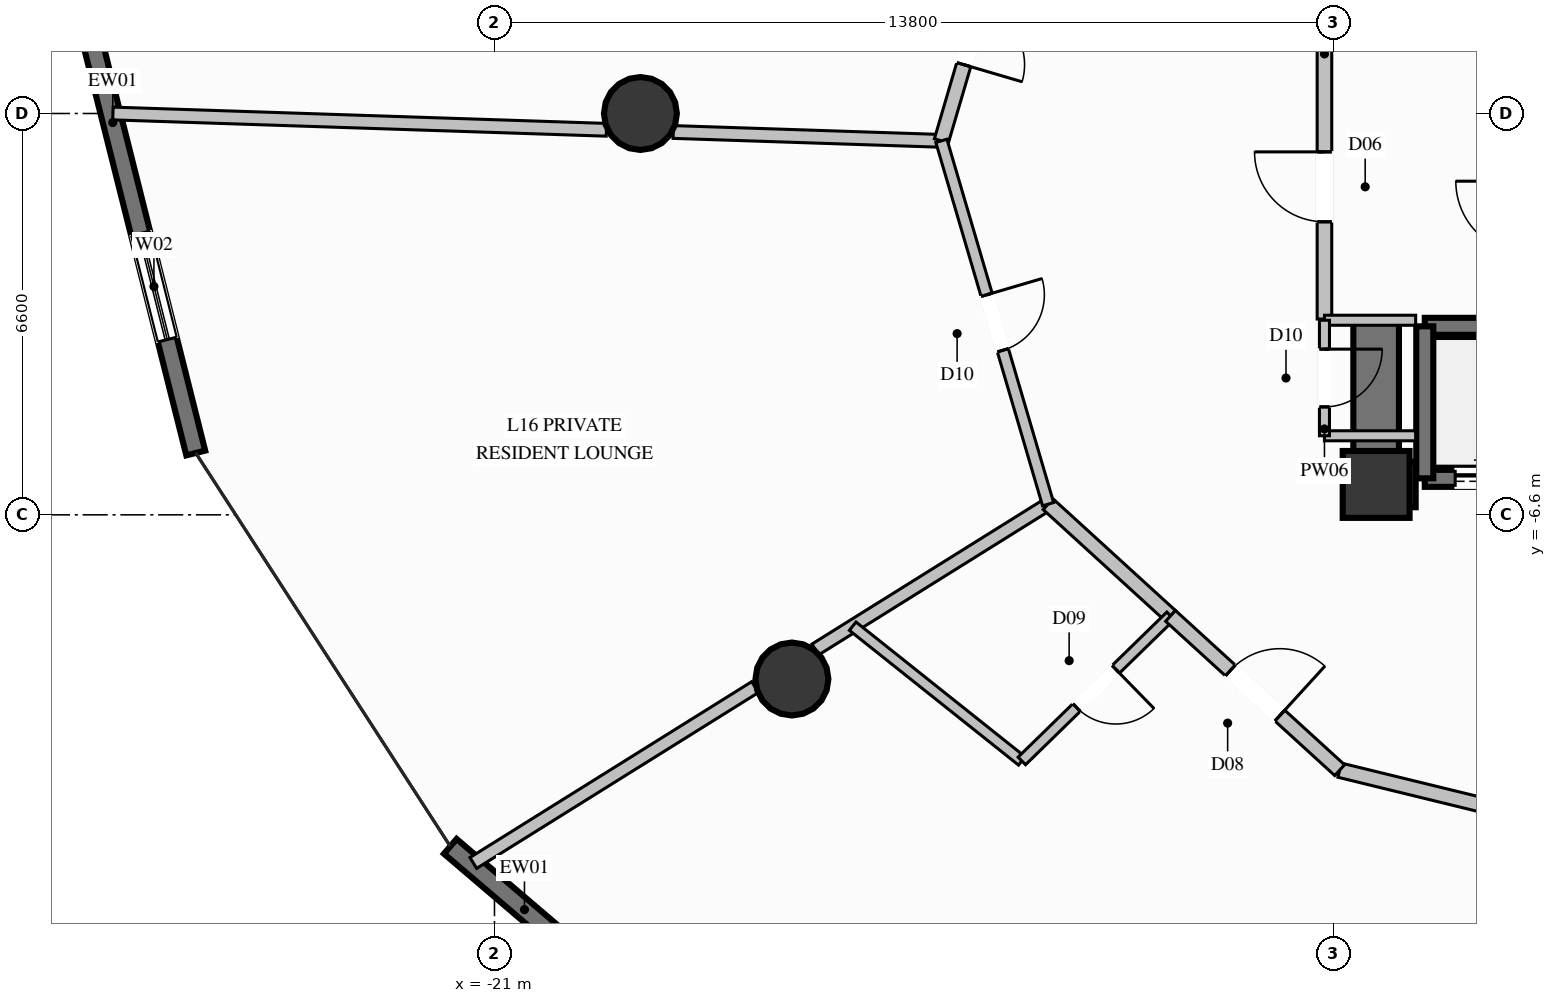
"""IFC4 building model, lengths in metres.
Left out: names, types, materials, properties, quantities, classifications, styles, units other than length and angle.
Written with IfcOpenShell. Run it as: python <this file> out.ifc"""

import sys

from ifc_helpers import new_model, si_unit, direction, frame, frame_2d, origin, origin_2d, place, context, subcontext, project, spatial, rectangle, circle, extrude, element, fill, save


model = new_model("IFC4")
c1 = context("Model", 3, precision=1e-05, world=origin(), true_north=direction((0.0, 1.0)))
c2 = subcontext(c1, "Body", "Model", "MODEL_VIEW")
j1 = project(units=[si_unit("LENGTHUNIT", "METRE"), si_unit("PLANEANGLEUNIT", "RADIAN")], contexts=[c1])
p1 = place(None, origin())
s1 = spatial("IfcSite", under=j1, at=p1, CompositionType="ELEMENT")
p2 = place(p1, origin())
s2 = spatial("IfcBuilding", under=s1, at=p2, CompositionType="ELEMENT")
p3 = place(p2, frame((0.0, 0.0, 68.0)))
s3 = spatial("IfcBuildingStorey", under=s2, at=p3, CompositionType="ELEMENT", Elevation=68.0)
p4 = place(p3, frame((-6.5, -6.1, 0.0), z_axis=(0.0, 0.0, 1.0), x_axis=(1.0, 0.0, 0.0)))
e1 = element("IfcColumn", 1, at=p4, inside=s3, PredefinedType="COLUMN", context=c2, shape_type="SweptSolid", body=[
    extrude(rectangle(XDim=1.1, YDim=1.1, at=origin_2d()), origin(), (0.0, 0.0, 1.0), 3.6),
])
p5 = place(p3, frame((-6.125, -6.1, 0.0), z_axis=(0.0, 0.0, 1.0), x_axis=(1.0, 0.0, 0.0)))
e2 = element("IfcWall", 2, at=p5, inside=s3, PredefinedType="SHEAR", context=c2, shape_type="SweptSolid", body=[
    extrude(rectangle(XDim=0.275, YDim=0.75, at=frame_2d((0.137, 0.0))), origin(), (0.0, 0.0, 1.0), 3.6),
])
p6 = place(p3, frame((-6.5, -6.475, 0.0), z_axis=(0.0, 0.0, 1.0), x_axis=(0.0, 1.0, 0.0)))
e3 = element("IfcWall", 3, at=p6, inside=s3, PredefinedType="SHEAR", context=c2, shape_type="SweptSolid", body=[
    extrude(rectangle(XDim=3.125, YDim=0.75, at=frame_2d((1.562, 0.0))), origin(), (0.0, 0.0, 1.0), 3.6),
])
for number, where, z_axis, x_axis in (
    (4, (-18.6, 0.0, 0.0), (0.0, 0.0, 1.0), (1.0, 0.0, 0.0)),
    (5, (-16.108, -9.3, 0.0), (0.0, 0.0, 1.0), (1.0, 0.0, 0.0)),
):
    element("IfcColumn", number, at=place(p3, frame(where, z_axis=z_axis, x_axis=x_axis)), inside=s3, PredefinedType="COLUMN", context=c2, shape_type="SweptSolid", body=[
        extrude(circle(Radius=0.6, at=origin_2d()), origin(), (0.0, 0.0, 1.0), 3.6),
    ])
p7 = place(p3, frame((-25.913, -5.583, 0.0), z_axis=(0.0, 0.0, 1.0), x_axis=(-0.243607685094, 0.969873855593, 0.0)))
e6 = element("IfcWall", 6, at=p7, inside=s3, PredefinedType="SOLIDWALL", context=c2, shape_type="SweptSolid", body=[
    extrude(rectangle(XDim=7.233, YDim=0.32, at=frame_2d((3.616, 0.0))), origin(), (0.0, 0.0, 1.0), 3.34),
])
p8 = place(p7, frame((1.923, 0.0, 0.35)))
e7 = element("IfcOpeningElement", 7, at=p8, cuts=e6, PredefinedType="OPENING", context=c2, shape_type="SweptSolid", body=[
    extrude(rectangle(XDim=1.8, YDim=2.6, at=frame_2d((0.9, 1.3))), frame((0.0, 0.17, 0.0), z_axis=(0.0, -1.0, 0.0), x_axis=(1.0, 0.0, 0.0)), (0.0, 0.0, 1.0), 0.34),
])
p9 = place(p3, frame((-15.527, -17.341, 0.0), z_axis=(0.0, 0.0, 1.0), x_axis=(-0.76078130933, 0.649008319958, 0.0)))
e8 = element("IfcWall", 8, at=p9, inside=s3, PredefinedType="SOLIDWALL", context=c2, shape_type="SweptSolid", body=[
    extrude(rectangle(XDim=8.149, YDim=0.32, at=frame_2d((4.075, 0.0))), origin(), (0.0, 0.0, 1.0), 3.34),
])
p10 = place(p9, frame((2.892, 0.0, 0.35)))
e9 = element("IfcOpeningElement", 9, at=p10, cuts=e8, PredefinedType="OPENING", context=c2, shape_type="SweptSolid", body=[
    extrude(rectangle(XDim=1.8, YDim=2.6, at=frame_2d((0.9, 1.3))), frame((0.0, 0.17, 0.0), z_axis=(0.0, -1.0, 0.0), x_axis=(1.0, 0.0, 0.0)), (0.0, 0.0, 1.0), 0.34),
])
p11 = place(p3, frame((-5.7, -6.0, 0.0), z_axis=(0.0, 0.0, 1.0), x_axis=(1.0, 0.0, 0.0)))
e10 = element("IfcWall", 10, at=p11, inside=s3, PredefinedType="SOLIDWALL", context=c2, shape_type="SweptSolid", body=[
    extrude(rectangle(XDim=2.1, YDim=0.28, at=frame_2d((1.05, 0.0))), origin(), (0.0, 0.0, 1.0), 3.34),
])
p12 = place(p11, frame((0.5, 0.0, 0.0)))
e11 = element("IfcOpeningElement", 11, at=p12, cuts=e10, PredefinedType="OPENING", context=c2, shape_type="SweptSolid", body=[
    extrude(rectangle(XDim=1.1, YDim=2.2, at=frame_2d((0.55, 1.1))), frame((0.0, 0.15, 0.0), z_axis=(0.0, -1.0, 0.0), x_axis=(1.0, 0.0, 0.0)), (0.0, 0.0, 1.0), 0.3),
])
p13 = place(p3, frame((-3.6, -3.5, 0.0), z_axis=(0.0, 0.0, 1.0), x_axis=(-1.0, 0.0, 0.0)))
e12 = element("IfcWall", 12, at=p13, inside=s3, PredefinedType="SOLIDWALL", context=c2, shape_type="SweptSolid", body=[
    extrude(rectangle(XDim=2.1, YDim=0.28, at=frame_2d((1.05, 0.0))), origin(), (0.0, 0.0, 1.0), 3.34),
])
p14 = place(p3, frame((-5.7, -3.5, 0.0), z_axis=(0.0, 0.0, 1.0), x_axis=(0.0, -1.0, 0.0)))
e13 = element("IfcWall", 13, at=p14, inside=s3, PredefinedType="SOLIDWALL", context=c2, shape_type="SweptSolid", body=[
    extrude(rectangle(XDim=2.5, YDim=0.28, at=frame_2d((1.25, 0.0))), origin(), (0.0, 0.0, 1.0), 3.34),
])
p15 = place(p3, frame((-7.35, -3.38, 0.0), z_axis=(0.0, 0.0, 1.0), x_axis=(0.0, 1.0, 0.0)))
e14 = element("IfcWall", 14, at=p15, inside=s3, PredefinedType="PARTITIONING", context=c2, shape_type="SweptSolid", body=[
    extrude(rectangle(XDim=5.72, YDim=0.24, at=frame_2d((2.86, 0.0))), origin(), (0.0, 0.0, 1.0), 2.425),
])
p16 = place(p15, frame((1.599, 0.0, 0.0)))
e15 = element("IfcOpeningElement", 15, at=p16, cuts=e14, PredefinedType="OPENING", context=c2, shape_type="SweptSolid", body=[
    extrude(rectangle(XDim=1.15, YDim=2.2, at=frame_2d((0.575, 1.1))), frame((0.0, 0.13, 0.0), z_axis=(0.0, -1.0, 0.0), x_axis=(1.0, 0.0, 0.0)), (0.0, 0.0, 1.0), 0.26),
])
p17 = place(p3, frame((-7.35, -5.3, 0.0), z_axis=(0.0, 0.0, 1.0), x_axis=(1.0, 0.0, 0.0)))
e16 = element("IfcWall", 16, at=p17, inside=s3, PredefinedType="PARTITIONING", context=c2, shape_type="SweptSolid", body=[
    extrude(rectangle(XDim=1.5, YDim=0.165, at=frame_2d((0.75, 0.0))), origin(), (0.0, 0.0, 1.0), 2.425),
])
p18 = place(p3, frame((-5.85, -3.4, 0.0), z_axis=(0.0, 0.0, 1.0), x_axis=(-1.0, 0.0, 0.0)))
e17 = element("IfcWall", 17, at=p18, inside=s3, PredefinedType="PARTITIONING", context=c2, shape_type="SweptSolid", body=[
    extrude(rectangle(XDim=1.5, YDim=0.165, at=frame_2d((0.75, 0.0))), origin(), (0.0, 0.0, 1.0), 3.34),
])
p19 = place(p3, frame((-7.35, -3.4, 0.0), z_axis=(0.0, 0.0, 1.0), x_axis=(0.0, -1.0, 0.0)))
e18 = element("IfcWall", 18, at=p19, inside=s3, PredefinedType="PARTITIONING", context=c2, shape_type="SweptSolid", body=[
    extrude(rectangle(XDim=1.9, YDim=0.165, at=frame_2d((0.95, 0.0))), origin(), (0.0, 0.0, 1.0), 3.34),
])
p20 = place(p19, frame((0.475, 0.0, 0.0)))
e19 = element("IfcOpeningElement", 19, at=p20, cuts=e18, PredefinedType="OPENING", context=c2, shape_type="SweptSolid", body=[
    extrude(rectangle(XDim=0.95, YDim=2.1, at=frame_2d((0.475, 1.05))), frame((0.0, 0.093, 0.0), z_axis=(0.0, -1.0, 0.0), x_axis=(1.0, 0.0, 0.0)), (0.0, 0.0, 1.0), 0.185),
])
p21 = place(p3, frame((-13.65, -0.45, 0.0), z_axis=(0.0, 0.0, 1.0), x_axis=(-0.999452495438, 0.033086392398, 0.0)))
e20 = element("IfcWall", 20, at=p21, inside=s3, PredefinedType="PARTITIONING", context=c2, shape_type="SweptSolid", body=[
    extrude(rectangle(XDim=4.413, YDim=0.21, at=frame_2d((2.206, 0.0))), origin(), (0.0, 0.0, 1.0), 2.709),
])
p22 = place(p3, frame((-19.159, -0.268, 0.0), z_axis=(0.0, 0.0, 1.0), x_axis=(-0.999454971643, 0.033011507952, 0.0)))
e21 = element("IfcWall", 21, at=p22, inside=s3, PredefinedType="PARTITIONING", context=c2, shape_type="SweptSolid", body=[
    extrude(rectangle(XDim=8.12, YDim=0.21, at=frame_2d((4.06, 0.0))), origin(), (0.0, 0.0, 1.0), 3.34),
])
p23 = place(p3, frame((-11.895, -6.425, 0.0), z_axis=(0.0, 0.0, 1.0), x_axis=(-0.848347688913, -0.529439513746, 0.0)))
e22 = element("IfcWall", 22, at=p23, inside=s3, PredefinedType="PARTITIONING", context=c2, shape_type="SweptSolid", body=[
    extrude(rectangle(XDim=4.512, YDim=0.21, at=frame_2d((2.256, 0.0))), origin(), (0.0, 0.0, 1.0), 2.709),
])
p24 = place(p3, frame((-16.714, -9.433, 0.0), z_axis=(0.0, 0.0, 1.0), x_axis=(-0.848349667148, -0.529436343908, 0.0)))
e23 = element("IfcWall", 23, at=p24, inside=s3, PredefinedType="PARTITIONING", context=c2, shape_type="SweptSolid", body=[
    extrude(rectangle(XDim=5.462, YDim=0.21, at=frame_2d((2.731, 0.0))), origin(), (0.0, 0.0, 1.0), 3.34),
])
p25 = place(p3, frame((-11.895, -6.425, 0.0), z_axis=(0.0, 0.0, 1.0), x_axis=(0.738828610863, -0.673893377153, 0.0)))
e24 = element("IfcWall", 24, at=p25, inside=s3, PredefinedType="PARTITIONING", context=c2, shape_type="SweptSolid", body=[
    extrude(rectangle(XDim=2.726, YDim=0.24, at=frame_2d((1.363, 0.0))), origin(), (0.0, 0.0, 1.0), 3.34),
])
p26 = place(p3, frame((-15.109, -8.431, 0.0), z_axis=(0.0, 0.0, 1.0), x_axis=(0.782172971141, -0.623061347876, 0.0)))
e25 = element("IfcWall", 25, at=p26, inside=s3, PredefinedType="PLUMBINGWALL", context=c2, shape_type="SweptSolid", body=[
    extrude(rectangle(XDim=3.557, YDim=0.175, at=frame_2d((1.778, 0.0))), origin(), (0.0, 0.0, 1.0), 3.34),
])
p27 = place(p3, frame((-9.881, -8.262, 0.0), z_axis=(0.0, 0.0, 1.0), x_axis=(-0.715948341259, -0.698153258711, 0.0)))
e26 = element("IfcWall", 26, at=p27, inside=s3, PredefinedType="PLUMBINGWALL", context=c2, shape_type="SweptSolid", body=[
    extrude(rectangle(XDim=3.416, YDim=0.175, at=frame_2d((1.708, 0.0))), origin(), (0.0, 0.0, 1.0), 3.34),
])
p28 = place(p27, frame((1.258, 0.0, 0.0)))
e27 = element("IfcOpeningElement", 27, at=p28, cuts=e26, PredefinedType="OPENING", context=c2, shape_type="SweptSolid", body=[
    extrude(rectangle(XDim=0.9, YDim=2.1, at=frame_2d((0.45, 1.05))), frame((0.0, 0.098, 0.0), z_axis=(0.0, -1.0, 0.0), x_axis=(1.0, 0.0, 0.0)), (0.0, 0.0, 1.0), 0.195),
])
p29 = place(p3, frame((-7.1, -10.799, 0.0), z_axis=(0.0, 0.0, 1.0), x_axis=(0.971409027631, -0.237412091177, 0.0)))
e28 = element("IfcWall", 28, at=p29, inside=s3, PredefinedType="PARTITIONING", context=c2, shape_type="SweptSolid", body=[
    extrude(rectangle(XDim=6.743, YDim=0.24, at=frame_2d((3.372, 0.0))), origin(), (0.0, 0.0, 1.0), 3.34),
])
p30 = place(p3, frame((-9.881, -8.262, 0.0), z_axis=(0.0, 0.0, 1.0), x_axis=(0.738759226612, -0.67396943929, 0.0)))
e29 = element("IfcWall", 29, at=p30, inside=s3, PredefinedType="PARTITIONING", context=c2, shape_type="SweptSolid", body=[
    extrude(rectangle(XDim=3.764, YDim=0.24, at=frame_2d((1.882, 0.0))), origin(), (0.0, 0.0, 1.0), 3.34),
])
p31 = place(p30, frame((1.332, 0.0, 0.0)))
e30 = element("IfcOpeningElement", 30, at=p31, cuts=e29, PredefinedType="OPENING", context=c2, shape_type="SweptSolid", body=[
    extrude(rectangle(XDim=1.1, YDim=2.3, at=frame_2d((0.55, 1.15))), frame((0.0, 0.13, 0.0), z_axis=(0.0, -1.0, 0.0), x_axis=(1.0, 0.0, 0.0)), (0.0, 0.0, 1.0), 0.26),
])
p32 = place(p3, frame((-12.632, 3.016, 0.0), z_axis=(0.0, 0.0, 1.0), x_axis=(-0.281756491287, -0.959485945503, 0.0)))
e31 = element("IfcWall", 31, at=p32, inside=s3, PredefinedType="PARTITIONING", context=c2, shape_type="SweptSolid", body=[
    extrude(rectangle(XDim=3.612, YDim=0.24, at=frame_2d((1.806, 0.0))), origin(), (0.0, 0.0, 1.0), 3.34),
])
p33 = place(p32, frame((1.306, 0.0, 0.0)))
e32 = element("IfcOpeningElement", 32, at=p33, cuts=e31, PredefinedType="OPENING", context=c2, shape_type="SweptSolid", body=[
    extrude(rectangle(XDim=1.0, YDim=2.2, at=frame_2d((0.5, 1.1))), frame((0.0, 0.13, 0.0), z_axis=(0.0, -1.0, 0.0), x_axis=(1.0, 0.0, 0.0)), (0.0, 0.0, 1.0), 0.26),
])
p34 = place(p3, frame((-13.65, -0.45, 0.0), z_axis=(0.0, 0.0, 1.0), x_axis=(0.281796988209, -0.959474052508, 0.0)))
e33 = element("IfcWall", 33, at=p34, inside=s3, PredefinedType="PARTITIONING", context=c2, shape_type="SweptSolid", body=[
    extrude(rectangle(XDim=6.228, YDim=0.19, at=frame_2d((3.114, 0.0))), origin(), (0.0, 0.0, 1.0), 3.34),
])
p35 = place(p34, frame((2.639, 0.0, 0.0)))
e34 = element("IfcOpeningElement", 34, at=p35, cuts=e33, PredefinedType="OPENING", context=c2, shape_type="SweptSolid", body=[
    extrude(rectangle(XDim=0.95, YDim=2.1, at=frame_2d((0.475, 1.05))), frame((0.0, 0.105, 0.0), z_axis=(0.0, -1.0, 0.0), x_axis=(1.0, 0.0, 0.0)), (0.0, 0.0, 1.0), 0.21),
])
p36 = place(p8, origin())
e35 = element("IfcWindow", 35, at=p36, inside=s3, PartitioningType="SINGLE_PANEL", PredefinedType="WINDOW", context=c2, shape_type="SweptSolid", body=[
    extrude(rectangle(XDim=1.8, YDim=2.6, at=frame_2d((0.9, 1.3))), frame((0.0, 0.03, 0.0), z_axis=(0.0, -1.0, 0.0), x_axis=(1.0, 0.0, 0.0)), (0.0, 0.0, 1.0), 0.06),
])
fill(e7, e35)
p37 = place(p12, origin())
e36 = element("IfcDoor", 36, at=p37, inside=s3, OperationType="SLIDING_TO_LEFT", PredefinedType="DOOR", context=c2, shape_type="SweptSolid", body=[
    extrude(rectangle(XDim=1.1, YDim=2.2, at=frame_2d((0.55, 1.1))), frame((0.0, 0.025, 0.0), z_axis=(0.0, -1.0, 0.0), x_axis=(1.0, 0.0, 0.0)), (0.0, 0.0, 1.0), 0.05),
])
fill(e11, e36)
p38 = place(p16, origin())
e37 = element("IfcDoor", 37, at=p38, inside=s3, OperationType="SINGLE_SWING_RIGHT", PredefinedType="DOOR", context=c2, shape_type="SweptSolid", body=[
    extrude(rectangle(XDim=1.15, YDim=2.2, at=frame_2d((0.575, 1.1))), frame((0.0, 0.025, 0.0), z_axis=(0.0, -1.0, 0.0), x_axis=(1.0, 0.0, 0.0)), (0.0, 0.0, 1.0), 0.05),
])
fill(e15, e37)
p39 = place(p20, origin())
e38 = element("IfcDoor", 38, at=p39, inside=s3, OperationType="SINGLE_SWING_LEFT", PredefinedType="DOOR", context=c2, shape_type="SweptSolid", body=[
    extrude(rectangle(XDim=0.95, YDim=2.1, at=frame_2d((0.475, 1.05))), frame((0.0, 0.025, 0.0), z_axis=(0.0, -1.0, 0.0), x_axis=(1.0, 0.0, 0.0)), (0.0, 0.0, 1.0), 0.05),
])
fill(e19, e38)
p40 = place(p28, origin())
e39 = element("IfcDoor", 39, at=p40, inside=s3, OperationType="SINGLE_SWING_LEFT", PredefinedType="DOOR", context=c2, shape_type="SweptSolid", body=[
    extrude(rectangle(XDim=0.9, YDim=2.1, at=frame_2d((0.45, 1.05))), frame((0.0, 0.025, 0.0), z_axis=(0.0, -1.0, 0.0), x_axis=(1.0, 0.0, 0.0)), (0.0, 0.0, 1.0), 0.05),
])
fill(e27, e39)
p41 = place(p31, origin())
e40 = element("IfcDoor", 40, at=p41, inside=s3, OperationType="SINGLE_SWING_RIGHT", PredefinedType="DOOR", context=c2, shape_type="SweptSolid", body=[
    extrude(rectangle(XDim=1.1, YDim=2.3, at=frame_2d((0.55, 1.15))), frame((0.0, 0.025, 0.0), z_axis=(0.0, -1.0, 0.0), x_axis=(1.0, 0.0, 0.0)), (0.0, 0.0, 1.0), 0.05),
])
fill(e30, e40)
p42 = place(p33, origin())
e41 = element("IfcDoor", 41, at=p42, inside=s3, OperationType="SINGLE_SWING_RIGHT", PredefinedType="DOOR", context=c2, shape_type="SweptSolid", body=[
    extrude(rectangle(XDim=1.0, YDim=2.2, at=frame_2d((0.5, 1.1))), frame((0.0, 0.025, 0.0), z_axis=(0.0, -1.0, 0.0), x_axis=(1.0, 0.0, 0.0)), (0.0, 0.0, 1.0), 0.05),
])
fill(e32, e41)
p43 = place(p35, origin())
e42 = element("IfcDoor", 42, at=p43, inside=s3, OperationType="SINGLE_SWING_LEFT", PredefinedType="DOOR", context=c2, shape_type="SweptSolid", body=[
    extrude(rectangle(XDim=0.95, YDim=2.1, at=frame_2d((0.475, 1.05))), frame((0.0, 0.025, 0.0), z_axis=(0.0, -1.0, 0.0), x_axis=(1.0, 0.0, 0.0)), (0.0, 0.0, 1.0), 0.05),
])
fill(e34, e42)
save(model, sys.argv[1])
